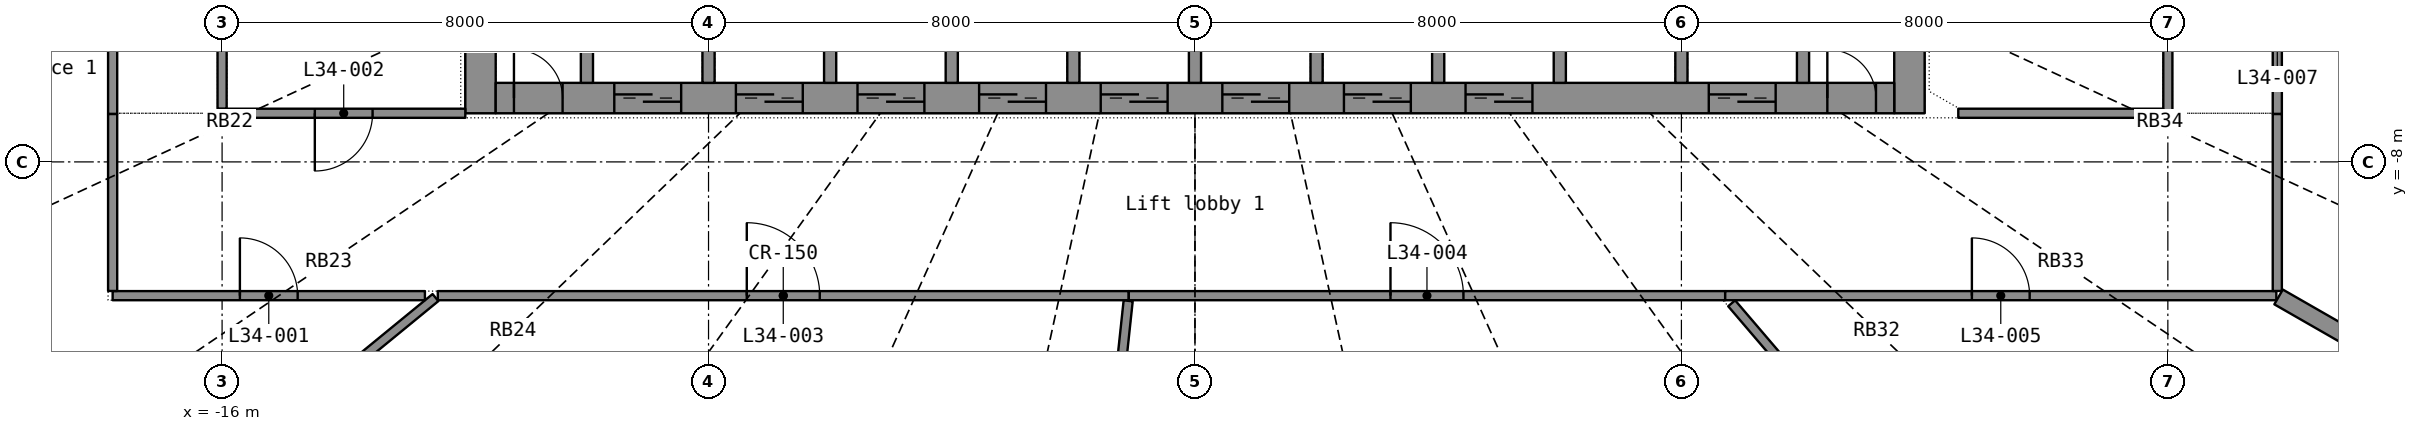
"""IFC4 building model, lengths in metres.
Left out: names, types, materials, properties, quantities, classifications, styles, units other than length and angle.
Written with IfcOpenShell. Run it as: python <this file> out.ifc"""

import sys

from ifc_helpers import new_model, si_unit, direction, frame, frame_2d, origin, place, context, subcontext, project, spatial, rectangle, extrude, element, fill, save


model = new_model("IFC4")
c1 = context("Model", 3, precision=1e-05, world=origin(), true_north=direction((0.0, 1.0)))
c2 = subcontext(c1, "Body", "Model", "MODEL_VIEW")
j1 = project(units=[si_unit("LENGTHUNIT", "METRE"), si_unit("PLANEANGLEUNIT", "RADIAN")], contexts=[c1])
p1 = place(None, origin())
s1 = spatial("IfcSite", under=j1, at=p1, CompositionType="ELEMENT")
p2 = place(p1, origin())
s2 = spatial("IfcBuilding", under=s1, at=p2, CompositionType="ELEMENT")
p3 = place(p2, frame((0.0, 0.0, 141.5)))
s3 = spatial("IfcBuildingStorey", under=s2, at=p3, CompositionType="ELEMENT", Elevation=141.5)
p4 = place(p3, frame((-11.75, -7.2, 0.0), z_axis=(0.0, 0.0, 1.0), x_axis=(0.0, 1.0, 0.0)))
e1 = element("IfcWall", 1, at=p4, inside=s3, PredefinedType="SHEAR", context=c2, shape_type="SweptSolid", body=[
    extrude(rectangle(XDim=14.4, YDim=0.5, at=frame_2d((7.2, 0.0))), origin(), (0.0, 0.0, 1.0), 3.3),
])
p5 = place(p4, frame((6.5, 0.0, 0.0)))
e2 = element("IfcOpeningElement", 2, at=p5, cuts=e1, PredefinedType="OPENING", context=c2, shape_type="SweptSolid", body=[
    extrude(rectangle(XDim=1.4, YDim=2.2, at=frame_2d((0.7, 1.1))), frame((0.0, 0.26, 0.0), z_axis=(0.0, -1.0, 0.0), x_axis=(1.0, 0.0, 0.0)), (0.0, 0.0, 1.0), 0.52),
])
p6 = place(p3, frame((11.75, -7.2, 0.0), z_axis=(0.0, 0.0, 1.0), x_axis=(0.0, 1.0, 0.0)))
e3 = element("IfcWall", 3, at=p6, inside=s3, PredefinedType="SHEAR", context=c2, shape_type="SweptSolid", body=[
    extrude(rectangle(XDim=14.4, YDim=0.5, at=frame_2d((7.2, 0.0))), origin(), (0.0, 0.0, 1.0), 3.3),
])
p7 = place(p6, frame((6.5, 0.0, 0.0)))
e4 = element("IfcOpeningElement", 4, at=p7, cuts=e3, PredefinedType="OPENING", context=c2, shape_type="SweptSolid", body=[
    extrude(rectangle(XDim=1.4, YDim=2.2, at=frame_2d((0.7, 1.1))), frame((0.0, 0.26, 0.0), z_axis=(0.0, -1.0, 0.0), x_axis=(1.0, 0.0, 0.0)), (0.0, 0.0, 1.0), 0.52),
])
p8 = place(p3, frame((-11.5, -6.95, 0.0), z_axis=(0.0, 0.0, 1.0), x_axis=(1.0, 0.0, 0.0)))
e5 = element("IfcWall", 5, at=p8, inside=s3, PredefinedType="SHEAR", context=c2, shape_type="SweptSolid", body=[
    extrude(rectangle(XDim=23.0, YDim=0.5, at=frame_2d((11.5, 0.0))), origin(), (0.0, 0.0, 1.0), 3.3),
])
p9 = place(p8, frame((1.95, 0.0, 0.0)))
e6 = element("IfcOpeningElement", 6, at=p9, cuts=e5, PredefinedType="OPENING", context=c2, shape_type="SweptSolid", body=[
    extrude(rectangle(XDim=1.1, YDim=2.2, at=frame_2d((0.55, 1.1))), frame((0.0, 0.26, 0.0), z_axis=(0.0, -1.0, 0.0), x_axis=(1.0, 0.0, 0.0)), (0.0, 0.0, 1.0), 0.52),
])
p10 = place(p8, frame((3.95, 0.0, 0.0)))
e7 = element("IfcOpeningElement", 7, at=p10, cuts=e5, PredefinedType="OPENING", context=c2, shape_type="SweptSolid", body=[
    extrude(rectangle(XDim=1.1, YDim=2.2, at=frame_2d((0.55, 1.1))), frame((0.0, 0.26, 0.0), z_axis=(0.0, -1.0, 0.0), x_axis=(1.0, 0.0, 0.0)), (0.0, 0.0, 1.0), 0.52),
])
p11 = place(p8, frame((5.95, 0.0, 0.0)))
e8 = element("IfcOpeningElement", 8, at=p11, cuts=e5, PredefinedType="OPENING", context=c2, shape_type="SweptSolid", body=[
    extrude(rectangle(XDim=1.1, YDim=2.2, at=frame_2d((0.55, 1.1))), frame((0.0, 0.26, 0.0), z_axis=(0.0, -1.0, 0.0), x_axis=(1.0, 0.0, 0.0)), (0.0, 0.0, 1.0), 0.52),
])
p12 = place(p8, frame((7.95, 0.0, 0.0)))
e9 = element("IfcOpeningElement", 9, at=p12, cuts=e5, PredefinedType="OPENING", context=c2, shape_type="SweptSolid", body=[
    extrude(rectangle(XDim=1.1, YDim=2.2, at=frame_2d((0.55, 1.1))), frame((0.0, 0.26, 0.0), z_axis=(0.0, -1.0, 0.0), x_axis=(1.0, 0.0, 0.0)), (0.0, 0.0, 1.0), 0.52),
])
p13 = place(p8, frame((9.95, 0.0, 0.0)))
e10 = element("IfcOpeningElement", 10, at=p13, cuts=e5, PredefinedType="OPENING", context=c2, shape_type="SweptSolid", body=[
    extrude(rectangle(XDim=1.1, YDim=2.2, at=frame_2d((0.55, 1.1))), frame((0.0, 0.26, 0.0), z_axis=(0.0, -1.0, 0.0), x_axis=(1.0, 0.0, 0.0)), (0.0, 0.0, 1.0), 0.52),
])
p14 = place(p8, frame((11.95, 0.0, 0.0)))
e11 = element("IfcOpeningElement", 11, at=p14, cuts=e5, PredefinedType="OPENING", context=c2, shape_type="SweptSolid", body=[
    extrude(rectangle(XDim=1.1, YDim=2.2, at=frame_2d((0.55, 1.1))), frame((0.0, 0.26, 0.0), z_axis=(0.0, -1.0, 0.0), x_axis=(1.0, 0.0, 0.0)), (0.0, 0.0, 1.0), 0.52),
])
p15 = place(p8, frame((13.95, 0.0, 0.0)))
e12 = element("IfcOpeningElement", 12, at=p15, cuts=e5, PredefinedType="OPENING", context=c2, shape_type="SweptSolid", body=[
    extrude(rectangle(XDim=1.1, YDim=2.2, at=frame_2d((0.55, 1.1))), frame((0.0, 0.26, 0.0), z_axis=(0.0, -1.0, 0.0), x_axis=(1.0, 0.0, 0.0)), (0.0, 0.0, 1.0), 0.52),
])
p16 = place(p8, frame((15.95, 0.0, 0.0)))
e13 = element("IfcOpeningElement", 13, at=p16, cuts=e5, PredefinedType="OPENING", context=c2, shape_type="SweptSolid", body=[
    extrude(rectangle(XDim=1.1, YDim=2.2, at=frame_2d((0.55, 1.1))), frame((0.0, 0.26, 0.0), z_axis=(0.0, -1.0, 0.0), x_axis=(1.0, 0.0, 0.0)), (0.0, 0.0, 1.0), 0.52),
])
p17 = place(p8, frame((19.95, 0.0, 0.0)))
e14 = element("IfcOpeningElement", 14, at=p17, cuts=e5, PredefinedType="OPENING", context=c2, shape_type="SweptSolid", body=[
    extrude(rectangle(XDim=1.1, YDim=2.2, at=frame_2d((0.55, 1.1))), frame((0.0, 0.26, 0.0), z_axis=(0.0, -1.0, 0.0), x_axis=(1.0, 0.0, 0.0)), (0.0, 0.0, 1.0), 0.52),
])
p18 = place(p8, frame((0.3, 0.0, 0.0)))
e15 = element("IfcOpeningElement", 15, at=p18, cuts=e5, PredefinedType="OPENING", context=c2, shape_type="SweptSolid", body=[
    extrude(rectangle(XDim=0.8, YDim=2.05, at=frame_2d((0.4, 1.025))), frame((0.0, 0.26, 0.0), z_axis=(0.0, -1.0, 0.0), x_axis=(1.0, 0.0, 0.0)), (0.0, 0.0, 1.0), 0.52),
])
p19 = place(p8, frame((21.9, 0.0, 0.0)))
e16 = element("IfcOpeningElement", 16, at=p19, cuts=e5, PredefinedType="OPENING", context=c2, shape_type="SweptSolid", body=[
    extrude(rectangle(XDim=0.8, YDim=2.05, at=frame_2d((0.4, 1.025))), frame((0.0, 0.26, 0.0), z_axis=(0.0, -1.0, 0.0), x_axis=(1.0, 0.0, 0.0)), (0.0, 0.0, 1.0), 0.52),
])
for number, where, z_axis, x_axis in (
    (17, (-10.0, -6.7, 0.0), (0.0, 0.0, 1.0), (0.0, 1.0, 0.0)),
    (18, (-8.0, -6.7, 0.0), (0.0, 0.0, 1.0), (0.0, 1.0, 0.0)),
    (19, (-6.0, -6.7, 0.0), (0.0, 0.0, 1.0), (0.0, 1.0, 0.0)),
    (20, (-4.0, -6.7, 0.0), (0.0, 0.0, 1.0), (0.0, 1.0, 0.0)),
    (21, (-2.0, -6.7, 0.0), (0.0, 0.0, 1.0), (0.0, 1.0, 0.0)),
    (22, (0.0, -6.7, 0.0), (0.0, 0.0, 1.0), (0.0, 1.0, 0.0)),
    (23, (2.0, -6.7, 0.0), (0.0, 0.0, 1.0), (0.0, 1.0, 0.0)),
    (24, (4.0, -6.7, 0.0), (0.0, 0.0, 1.0), (0.0, 1.0, 0.0)),
    (25, (6.0, -6.7, 0.0), (0.0, 0.0, 1.0), (0.0, 1.0, 0.0)),
    (26, (8.0, -6.7, 0.0), (0.0, 0.0, 1.0), (0.0, 1.0, 0.0)),
    (27, (10.0, -6.7, 0.0), (0.0, 0.0, 1.0), (0.0, 1.0, 0.0)),
):
    element("IfcWall", number, at=place(p3, frame(where, z_axis=z_axis, x_axis=x_axis)), inside=s3, PredefinedType="SHEAR", context=c2, shape_type="SweptSolid", body=[
        extrude(rectangle(XDim=2.8, YDim=0.2, at=frame_2d((1.4, 0.0))), origin(), (0.0, 0.0, 1.0), 3.3),
    ])
p20 = place(p3, frame((-12.452, -10.2, 0.0), z_axis=(0.0, 0.0, 1.0), x_axis=(1.0, 0.0, 0.0)))
e28 = element("IfcWall", 28, at=p20, inside=s3, PredefinedType="PARTITIONING", context=c2, shape_type="SweptSolid", body=[
    extrude(rectangle(XDim=11.363, YDim=0.15, at=frame_2d((5.681, 0.0))), origin(), (0.0, 0.0, 1.0), 2.4),
])
p21 = place(p20, frame((5.082, 0.0, 0.0)))
e29 = element("IfcOpeningElement", 29, at=p21, cuts=e28, PredefinedType="OPENING", context=c2, shape_type="SweptSolid", body=[
    extrude(rectangle(XDim=1.2, YDim=2.2, at=frame_2d((0.6, 1.1))), frame((0.0, 0.085, 0.0), z_axis=(0.0, -1.0, 0.0), x_axis=(1.0, 0.0, 0.0)), (0.0, 0.0, 1.0), 0.17),
])
p22 = place(p3, frame((-1.088, -10.2, 0.0), z_axis=(0.0, 0.0, 1.0), x_axis=(1.0, 0.0, 0.0)))
e30 = element("IfcWall", 30, at=p22, inside=s3, PredefinedType="PARTITIONING", context=c2, shape_type="SweptSolid", body=[
    extrude(rectangle(XDim=9.808, YDim=0.15, at=frame_2d((4.904, 0.0))), origin(), (0.0, 0.0, 1.0), 2.4),
])
p23 = place(p22, frame((4.304, 0.0, 0.0)))
e31 = element("IfcOpeningElement", 31, at=p23, cuts=e30, PredefinedType="OPENING", context=c2, shape_type="SweptSolid", body=[
    extrude(rectangle(XDim=1.2, YDim=2.2, at=frame_2d((0.6, 1.1))), frame((0.0, 0.085, 0.0), z_axis=(0.0, -1.0, 0.0), x_axis=(1.0, 0.0, 0.0)), (0.0, 0.0, 1.0), 0.17),
])
p24 = place(p3, frame((-2.118, -19.834, 0.0), z_axis=(0.0, 0.0, 1.0), x_axis=(0.106217143, 0.994342958, 0.0)))
e32 = element("IfcWall", 32, at=p24, inside=s3, PredefinedType="PARTITIONING", context=c2, shape_type="SweptSolid", body=[
    extrude(rectangle(XDim=9.603, YDim=0.15, at=frame_2d((4.802, 0.0))), origin(), (0.0, 0.0, 1.0), 2.4),
])
p25 = place(p3, frame((8.72, -10.2, 0.0), z_axis=(0.0, 0.0, 1.0), x_axis=(1.0, 0.0, 0.0)))
e33 = element("IfcWall", 33, at=p25, inside=s3, PredefinedType="PARTITIONING", context=c2, shape_type="SweptSolid", body=[
    extrude(rectangle(XDim=9.064, YDim=0.15, at=frame_2d((4.532, 0.0))), origin(), (0.0, 0.0, 1.0), 2.4),
])
p26 = place(p25, frame((4.057, 0.0, 0.0)))
e34 = element("IfcOpeningElement", 34, at=p26, cuts=e33, PredefinedType="OPENING", context=c2, shape_type="SweptSolid", body=[
    extrude(rectangle(XDim=0.95, YDim=2.15, at=frame_2d((0.475, 1.075))), frame((0.0, 0.085, 0.0), z_axis=(0.0, -1.0, 0.0), x_axis=(1.0, 0.0, 0.0)), (0.0, 0.0, 1.0), 0.17),
])
p27 = place(p3, frame((13.947, -16.315, 0.0), z_axis=(0.0, 0.0, 1.0), x_axis=(-0.649772776, 0.760128502, 0.0)))
e35 = element("IfcWall", 35, at=p27, inside=s3, PredefinedType="PARTITIONING", context=c2, shape_type="SweptSolid", body=[
    extrude(rectangle(XDim=7.88, YDim=0.15, at=frame_2d((3.94, 0.0))), origin(), (0.0, 0.0, 1.0), 2.4),
])
p28 = place(p3, frame((-17.195, -14.085, 0.0), z_axis=(0.0, 0.0, 1.0), x_axis=(0.77361018, 0.63366181, 0.0)))
e36 = element("IfcWall", 36, at=p28, inside=s3, PredefinedType="PARTITIONING", context=c2, shape_type="SweptSolid", body=[
    extrude(rectangle(XDim=6.081, YDim=0.15, at=frame_2d((3.041, 0.0))), origin(), (0.0, 0.0, 1.0), 2.4),
])
p29 = place(p3, frame((-17.8, -10.2, 0.0), z_axis=(0.0, 0.0, 1.0), x_axis=(1.0, 0.0, 0.0)))
e37 = element("IfcWall", 37, at=p29, inside=s3, PredefinedType="PARTITIONING", context=c2, shape_type="SweptSolid", body=[
    extrude(rectangle(XDim=5.136, YDim=0.15, at=frame_2d((2.568, 0.0))), origin(), (0.0, 0.0, 1.0), 2.4),
])
p30 = place(p29, frame((2.093, 0.0, 0.0)))
e38 = element("IfcOpeningElement", 38, at=p30, cuts=e37, PredefinedType="OPENING", context=c2, shape_type="SweptSolid", body=[
    extrude(rectangle(XDim=0.95, YDim=2.15, at=frame_2d((0.475, 1.075))), frame((0.0, 0.085, 0.0), z_axis=(0.0, -1.0, 0.0), x_axis=(1.0, 0.0, 0.0)), (0.0, 0.0, 1.0), 0.17),
])
p31 = place(p3, frame((-12.0, -7.2, 0.0), z_axis=(0.0, 0.0, 1.0), x_axis=(-1.0, 0.0, 0.0)))
e39 = element("IfcWall", 39, at=p31, inside=s3, PredefinedType="PARTITIONING", context=c2, shape_type="SweptSolid", body=[
    extrude(rectangle(XDim=4.0, YDim=0.15, at=frame_2d((2.0, 0.0))), origin(), (0.0, 0.0, 1.0), 2.4),
])
p32 = place(p31, frame((1.525, 0.0, 0.0)))
e40 = element("IfcOpeningElement", 40, at=p32, cuts=e39, PredefinedType="OPENING", context=c2, shape_type="SweptSolid", body=[
    extrude(rectangle(XDim=0.95, YDim=2.15, at=frame_2d((0.475, 1.075))), frame((0.0, 0.085, 0.0), z_axis=(0.0, -1.0, 0.0), x_axis=(1.0, 0.0, 0.0)), (0.0, 0.0, 1.0), 0.17),
])
p33 = place(p3, frame((-16.0, -7.123, 0.0), z_axis=(0.0, 0.0, 1.0), x_axis=(0.0, 1.0, 0.0)))
e41 = element("IfcWall", 41, at=p33, inside=s3, PredefinedType="PARTITIONING", context=c2, shape_type="SweptSolid", body=[
    extrude(rectangle(XDim=3.473, YDim=0.15, at=frame_2d((1.736, 0.0))), origin(), (0.0, 0.0, 1.0), 2.4),
])
p34 = place(p3, frame((16.0, -3.65, 0.0), z_axis=(0.0, 0.0, 1.0), x_axis=(0.0, -1.0, 0.0)))
e42 = element("IfcWall", 42, at=p34, inside=s3, PredefinedType="PARTITIONING", context=c2, shape_type="SweptSolid", body=[
    extrude(rectangle(XDim=3.55, YDim=0.15, at=frame_2d((1.775, 0.0))), origin(), (0.0, 0.0, 1.0), 2.4),
])
p35 = place(p34, frame((1.275, 0.0, 0.0)))
e43 = element("IfcOpeningElement", 43, at=p35, cuts=e42, PredefinedType="OPENING", context=c2, shape_type="SweptSolid", body=[
    extrude(rectangle(XDim=1.0, YDim=2.2, at=frame_2d((0.5, 1.1))), frame((0.0, 0.085, 0.0), z_axis=(0.0, -1.0, 0.0), x_axis=(1.0, 0.0, 0.0)), (0.0, 0.0, 1.0), 0.17),
])
p36 = place(p3, frame((15.923, -7.2, 0.0), z_axis=(0.0, 0.0, 1.0), x_axis=(-1.0, 0.0, 0.0)))
e44 = element("IfcWall", 44, at=p36, inside=s3, PredefinedType="PARTITIONING", context=c2, shape_type="SweptSolid", body=[
    extrude(rectangle(XDim=3.37, YDim=0.15, at=frame_2d((1.685, 0.0))), origin(), (0.0, 0.0, 1.0), 2.4),
])
p37 = place(p3, frame((-17.8, -4.069, 0.0), z_axis=(0.0, 0.0, 1.0), x_axis=(0.0, -1.0, 0.0)))
e45 = element("IfcWall", 45, at=p37, inside=s3, PredefinedType="PARTITIONING", context=c2, shape_type="SweptSolid", body=[
    extrude(rectangle(XDim=3.143, YDim=0.15, at=frame_2d((1.572, 0.0))), origin(), (0.0, 0.0, 1.0), 2.4),
])
p38 = place(p3, frame((17.8, -7.212, 0.0), z_axis=(0.0, 0.0, 1.0), x_axis=(0.0, 1.0, 0.0)))
e46 = element("IfcWall", 46, at=p38, inside=s3, PredefinedType="PARTITIONING", context=c2, shape_type="SweptSolid", body=[
    extrude(rectangle(XDim=3.143, YDim=0.15, at=frame_2d((1.572, 0.0))), origin(), (0.0, 0.0, 1.0), 2.4),
])
p39 = place(p38, frame((1.072, 0.0, 0.0)))
e47 = element("IfcOpeningElement", 47, at=p39, cuts=e46, PredefinedType="OPENING", context=c2, shape_type="SweptSolid", body=[
    extrude(rectangle(XDim=1.0, YDim=2.2, at=frame_2d((0.5, 1.1))), frame((0.0, 0.085, 0.0), z_axis=(0.0, -1.0, 0.0), x_axis=(1.0, 0.0, 0.0)), (0.0, 0.0, 1.0), 0.17),
])
for number, where, z_axis, x_axis in (
    (48, (17.8, -10.123, 0.0), (0.0, 0.0, 1.0), (0.0, 1.0, 0.0)),
    (49, (-17.8, -7.213, 0.0), (0.0, 0.0, 1.0), (0.0, -1.0, 0.0)),
):
    element("IfcWall", number, at=place(p3, frame(where, z_axis=z_axis, x_axis=x_axis)), inside=s3, PredefinedType="PARTITIONING", context=c2, shape_type="SweptSolid", body=[
        extrude(rectangle(XDim=2.91, YDim=0.15, at=frame_2d((1.455, 0.0))), origin(), (0.0, 0.0, 1.0), 2.4),
    ])
p40 = place(p3, frame((19.926, -11.428, 0.0), z_axis=(0.0, 0.0, 1.0), x_axis=(-0.867449362, 0.497525481, 0.0)))
e50 = element("IfcWall", 50, at=p40, inside=s3, PredefinedType="PARTITIONING", context=c2, shape_type="SweptSolid", body=[
    extrude(rectangle(XDim=2.426, YDim=0.28, at=frame_2d((1.213, 0.0))), origin(), (0.0, 0.0, 1.0), 2.4),
])
p41 = place(p9, origin())
e51 = element("IfcDoor", 51, at=p41, inside=s3, OperationType="DOUBLE_DOOR_SLIDING", PredefinedType="DOOR", context=c2, shape_type="SweptSolid", body=[
    extrude(rectangle(XDim=1.1, YDim=2.2, at=frame_2d((0.55, 1.1))), frame((0.0, 0.025, 0.0), z_axis=(0.0, -1.0, 0.0), x_axis=(1.0, 0.0, 0.0)), (0.0, 0.0, 1.0), 0.05),
])
fill(e6, e51)
p42 = place(p10, origin())
e52 = element("IfcDoor", 52, at=p42, inside=s3, OperationType="DOUBLE_DOOR_SLIDING", PredefinedType="DOOR", context=c2, shape_type="SweptSolid", body=[
    extrude(rectangle(XDim=1.1, YDim=2.2, at=frame_2d((0.55, 1.1))), frame((0.0, 0.025, 0.0), z_axis=(0.0, -1.0, 0.0), x_axis=(1.0, 0.0, 0.0)), (0.0, 0.0, 1.0), 0.05),
])
fill(e7, e52)
p43 = place(p11, origin())
e53 = element("IfcDoor", 53, at=p43, inside=s3, OperationType="DOUBLE_DOOR_SLIDING", PredefinedType="DOOR", context=c2, shape_type="SweptSolid", body=[
    extrude(rectangle(XDim=1.1, YDim=2.2, at=frame_2d((0.55, 1.1))), frame((0.0, 0.025, 0.0), z_axis=(0.0, -1.0, 0.0), x_axis=(1.0, 0.0, 0.0)), (0.0, 0.0, 1.0), 0.05),
])
fill(e8, e53)
p44 = place(p12, origin())
e54 = element("IfcDoor", 54, at=p44, inside=s3, OperationType="DOUBLE_DOOR_SLIDING", PredefinedType="DOOR", context=c2, shape_type="SweptSolid", body=[
    extrude(rectangle(XDim=1.1, YDim=2.2, at=frame_2d((0.55, 1.1))), frame((0.0, 0.025, 0.0), z_axis=(0.0, -1.0, 0.0), x_axis=(1.0, 0.0, 0.0)), (0.0, 0.0, 1.0), 0.05),
])
fill(e9, e54)
p45 = place(p13, origin())
e55 = element("IfcDoor", 55, at=p45, inside=s3, OperationType="DOUBLE_DOOR_SLIDING", PredefinedType="DOOR", context=c2, shape_type="SweptSolid", body=[
    extrude(rectangle(XDim=1.1, YDim=2.2, at=frame_2d((0.55, 1.1))), frame((0.0, 0.025, 0.0), z_axis=(0.0, -1.0, 0.0), x_axis=(1.0, 0.0, 0.0)), (0.0, 0.0, 1.0), 0.05),
])
fill(e10, e55)
p46 = place(p14, origin())
e56 = element("IfcDoor", 56, at=p46, inside=s3, OperationType="DOUBLE_DOOR_SLIDING", PredefinedType="DOOR", context=c2, shape_type="SweptSolid", body=[
    extrude(rectangle(XDim=1.1, YDim=2.2, at=frame_2d((0.55, 1.1))), frame((0.0, 0.025, 0.0), z_axis=(0.0, -1.0, 0.0), x_axis=(1.0, 0.0, 0.0)), (0.0, 0.0, 1.0), 0.05),
])
fill(e11, e56)
p47 = place(p15, origin())
e57 = element("IfcDoor", 57, at=p47, inside=s3, OperationType="DOUBLE_DOOR_SLIDING", PredefinedType="DOOR", context=c2, shape_type="SweptSolid", body=[
    extrude(rectangle(XDim=1.1, YDim=2.2, at=frame_2d((0.55, 1.1))), frame((0.0, 0.025, 0.0), z_axis=(0.0, -1.0, 0.0), x_axis=(1.0, 0.0, 0.0)), (0.0, 0.0, 1.0), 0.05),
])
fill(e12, e57)
p48 = place(p16, origin())
e58 = element("IfcDoor", 58, at=p48, inside=s3, OperationType="DOUBLE_DOOR_SLIDING", PredefinedType="DOOR", context=c2, shape_type="SweptSolid", body=[
    extrude(rectangle(XDim=1.1, YDim=2.2, at=frame_2d((0.55, 1.1))), frame((0.0, 0.025, 0.0), z_axis=(0.0, -1.0, 0.0), x_axis=(1.0, 0.0, 0.0)), (0.0, 0.0, 1.0), 0.05),
])
fill(e13, e58)
p49 = place(p17, origin())
e59 = element("IfcDoor", 59, at=p49, inside=s3, OperationType="DOUBLE_DOOR_SLIDING", PredefinedType="DOOR", context=c2, shape_type="SweptSolid", body=[
    extrude(rectangle(XDim=1.1, YDim=2.2, at=frame_2d((0.55, 1.1))), frame((0.0, 0.025, 0.0), z_axis=(0.0, -1.0, 0.0), x_axis=(1.0, 0.0, 0.0)), (0.0, 0.0, 1.0), 0.05),
])
fill(e14, e59)
p50 = place(p18, origin())
e60 = element("IfcDoor", 60, at=p50, inside=s3, OperationType="SINGLE_SWING_LEFT", PredefinedType="DOOR", context=c2, shape_type="SweptSolid", body=[
    extrude(rectangle(XDim=0.8, YDim=2.05, at=frame_2d((0.4, 1.025))), frame((0.0, 0.025, 0.0), z_axis=(0.0, -1.0, 0.0), x_axis=(1.0, 0.0, 0.0)), (0.0, 0.0, 1.0), 0.05),
])
fill(e15, e60)
p51 = place(p19, origin())
e61 = element("IfcDoor", 61, at=p51, inside=s3, OperationType="SINGLE_SWING_LEFT", PredefinedType="DOOR", context=c2, shape_type="SweptSolid", body=[
    extrude(rectangle(XDim=0.8, YDim=2.05, at=frame_2d((0.4, 1.025))), frame((0.0, 0.025, 0.0), z_axis=(0.0, -1.0, 0.0), x_axis=(1.0, 0.0, 0.0)), (0.0, 0.0, 1.0), 0.05),
])
fill(e16, e61)
p52 = place(p30, origin())
e62 = element("IfcDoor", 62, at=p52, inside=s3, OperationType="SINGLE_SWING_LEFT", PredefinedType="DOOR", context=c2, shape_type="SweptSolid", body=[
    extrude(rectangle(XDim=0.95, YDim=2.15, at=frame_2d((0.475, 1.075))), frame((0.0, 0.025, 0.0), z_axis=(0.0, -1.0, 0.0), x_axis=(1.0, 0.0, 0.0)), (0.0, 0.0, 1.0), 0.05),
])
fill(e38, e62)
p53 = place(p32, origin())
e63 = element("IfcDoor", 63, at=p53, inside=s3, OperationType="SINGLE_SWING_RIGHT", PredefinedType="DOOR", context=c2, shape_type="SweptSolid", body=[
    extrude(rectangle(XDim=0.95, YDim=2.15, at=frame_2d((0.475, 1.075))), frame((0.0, 0.025, 0.0), z_axis=(0.0, -1.0, 0.0), x_axis=(1.0, 0.0, 0.0)), (0.0, 0.0, 1.0), 0.05),
])
fill(e40, e63)
p54 = place(p21, origin())
e64 = element("IfcDoor", 64, at=p54, inside=s3, OperationType="DOUBLE_DOOR_SINGLE_SWING", PredefinedType="DOOR", context=c2, shape_type="SweptSolid", body=[
    extrude(rectangle(XDim=1.2, YDim=2.2, at=frame_2d((0.6, 1.1))), frame((0.0, 0.025, 0.0), z_axis=(0.0, -1.0, 0.0), x_axis=(1.0, 0.0, 0.0)), (0.0, 0.0, 1.0), 0.05),
])
fill(e29, e64)
p55 = place(p23, origin())
e65 = element("IfcDoor", 65, at=p55, inside=s3, OperationType="DOUBLE_DOOR_SINGLE_SWING", PredefinedType="DOOR", context=c2, shape_type="SweptSolid", body=[
    extrude(rectangle(XDim=1.2, YDim=2.2, at=frame_2d((0.6, 1.1))), frame((0.0, 0.025, 0.0), z_axis=(0.0, -1.0, 0.0), x_axis=(1.0, 0.0, 0.0)), (0.0, 0.0, 1.0), 0.05),
])
fill(e31, e65)
p56 = place(p26, origin())
e66 = element("IfcDoor", 66, at=p56, inside=s3, OperationType="SINGLE_SWING_LEFT", PredefinedType="DOOR", context=c2, shape_type="SweptSolid", body=[
    extrude(rectangle(XDim=0.95, YDim=2.15, at=frame_2d((0.475, 1.075))), frame((0.0, 0.025, 0.0), z_axis=(0.0, -1.0, 0.0), x_axis=(1.0, 0.0, 0.0)), (0.0, 0.0, 1.0), 0.05),
])
fill(e34, e66)
save(model, sys.argv[1])
